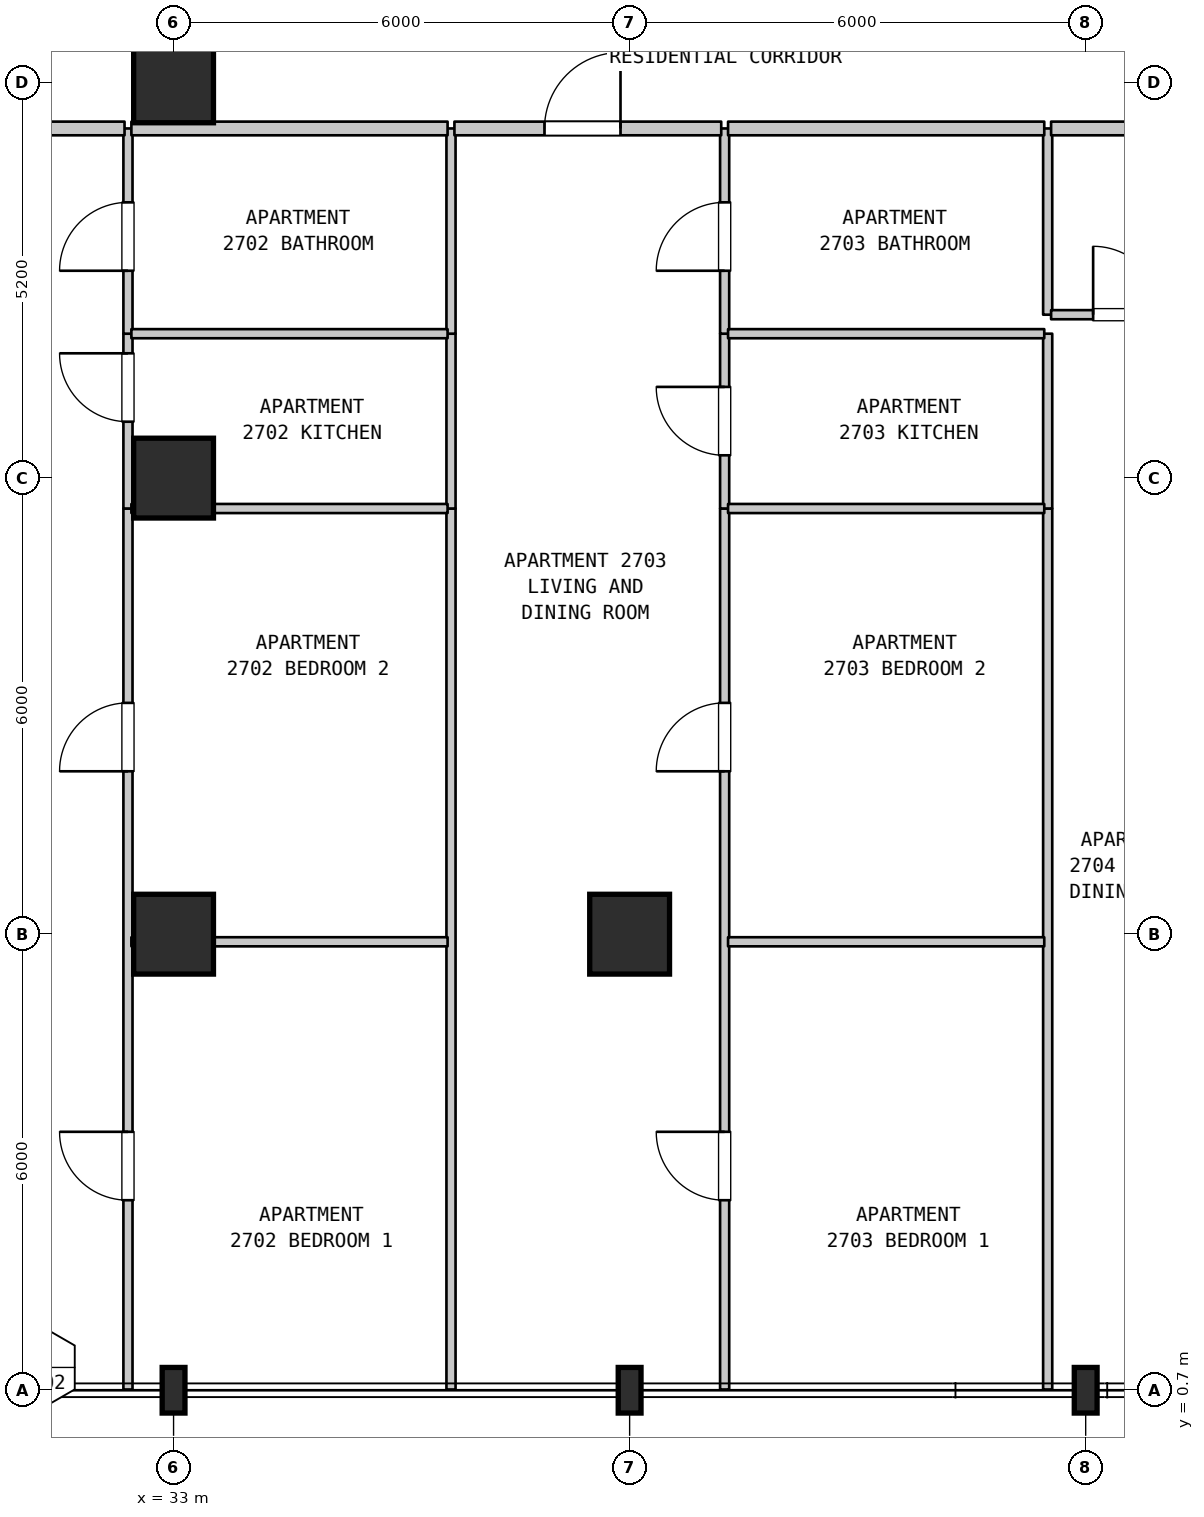
"""IFC4 building model, lengths in metres.
Left out: names, types, materials, properties, quantities, classifications, styles, units other than length and angle.
Written with IfcOpenShell. Run it as: python <this file> out.ifc"""

import sys

from ifc_helpers import new_model, si_unit, direction, frame, frame_2d, origin, origin_2d, place, context, subcontext, project, spatial, rectangle, i_section, extrude, element, fill, save


model = new_model("IFC4")
c1 = context("Model", 3, precision=1e-05, world=origin(), true_north=direction((0.0, 1.0)))
c2 = subcontext(c1, "Body", "Model", "MODEL_VIEW")
j1 = project(units=[si_unit("LENGTHUNIT", "METRE"), si_unit("PLANEANGLEUNIT", "RADIAN")], contexts=[c1])
p1 = place(None, origin())
s1 = spatial("IfcSite", under=j1, at=p1, CompositionType="ELEMENT")
p2 = place(p1, origin())
s2 = spatial("IfcBuilding", under=s1, at=p2, CompositionType="ELEMENT")
p3 = place(p2, frame((0.0, 0.0, 113.1)))
s3 = spatial("IfcBuildingStorey", under=s2, at=p3, CompositionType="ELEMENT", Elevation=113.1)
p4 = place(p3, frame((33.0, 0.7, 0.0), z_axis=(0.0, 0.0, 1.0), x_axis=(1.0, 0.0, 0.0)))
e1 = element("IfcColumn", 1, at=p4, inside=s3, PredefinedType="COLUMN", context=c2, shape_type="SweptSolid", body=[
    extrude(i_section(OverallWidth=0.3, OverallDepth=0.6, WebThickness=0.015, FlangeThickness=0.03, FilletRadius=0.027, at=origin_2d()), origin(), (0.0, 0.0, 1.0), 3.7),
])
for number, where, z_axis, x_axis in (
    (2, (33.0, 6.7, 0.0), (0.0, 0.0, 1.0), (1.0, 0.0, 0.0)),
    (3, (33.0, 12.7, 0.0), (0.0, 0.0, 1.0), (1.0, 0.0, 0.0)),
    (4, (33.0, 17.9, 0.0), (0.0, 0.0, 1.0), (1.0, 0.0, 0.0)),
):
    element("IfcColumn", number, at=place(p3, frame(where, z_axis=z_axis, x_axis=x_axis)), inside=s3, PredefinedType="COLUMN", context=c2, shape_type="SweptSolid", body=[
        extrude(rectangle(XDim=1.05, YDim=1.05, at=origin_2d()), origin(), (0.0, 0.0, 1.0), 3.7),
    ])
p5 = place(p3, frame((39.0, 0.7, 0.0), z_axis=(0.0, 0.0, 1.0), x_axis=(1.0, 0.0, 0.0)))
e5 = element("IfcColumn", 5, at=p5, inside=s3, PredefinedType="COLUMN", context=c2, shape_type="SweptSolid", body=[
    extrude(i_section(OverallWidth=0.3, OverallDepth=0.6, WebThickness=0.015, FlangeThickness=0.03, FilletRadius=0.027, at=origin_2d()), origin(), (0.0, 0.0, 1.0), 3.7),
])
p6 = place(p3, frame((39.0, 6.7, 0.0), z_axis=(0.0, 0.0, 1.0), x_axis=(1.0, 0.0, 0.0)))
e6 = element("IfcColumn", 6, at=p6, inside=s3, PredefinedType="COLUMN", context=c2, shape_type="SweptSolid", body=[
    extrude(rectangle(XDim=1.05, YDim=1.05, at=origin_2d()), origin(), (0.0, 0.0, 1.0), 3.7),
])
p7 = place(p3, frame((45.0, 0.7, 0.0), z_axis=(0.0, 0.0, 1.0), x_axis=(1.0, 0.0, 0.0)))
e7 = element("IfcColumn", 7, at=p7, inside=s3, PredefinedType="COLUMN", context=c2, shape_type="SweptSolid", body=[
    extrude(i_section(OverallWidth=0.3, OverallDepth=0.6, WebThickness=0.015, FlangeThickness=0.03, FilletRadius=0.027, at=origin_2d()), origin(), (0.0, 0.0, 1.0), 3.7),
])
p8 = place(p3, frame((32.4, 0.71, 0.0), z_axis=(0.0, 0.0, 1.0), x_axis=(0.0, 1.0, 0.0)))
e8 = element("IfcWall", 8, at=p8, inside=s3, PredefinedType="PARTITIONING", context=c2, shape_type="SweptSolid", body=[
    extrude(rectangle(XDim=11.59, YDim=0.12, at=frame_2d((5.795, 0.0))), origin(), (0.0, 0.0, 1.0), 3.385),
])
p9 = place(p8, frame((2.49, 0.0, 0.0)))
e9 = element("IfcOpeningElement", 9, at=p9, cuts=e8, PredefinedType="OPENING", context=c2, shape_type="SweptSolid", body=[
    extrude(rectangle(XDim=0.9, YDim=2.15, at=frame_2d((0.45, 1.075))), frame((0.0, 0.07, 0.0), z_axis=(0.0, -1.0, 0.0), x_axis=(1.0, 0.0, 0.0)), (0.0, 0.0, 1.0), 0.14),
])
p10 = place(p8, frame((8.133, 0.0, 0.0)))
e10 = element("IfcOpeningElement", 10, at=p10, cuts=e8, PredefinedType="OPENING", context=c2, shape_type="SweptSolid", body=[
    extrude(rectangle(XDim=0.9, YDim=2.15, at=frame_2d((0.45, 1.075))), frame((0.0, 0.07, 0.0), z_axis=(0.0, -1.0, 0.0), x_axis=(1.0, 0.0, 0.0)), (0.0, 0.0, 1.0), 0.14),
])
p11 = place(p3, frame((32.4, 12.3, 0.0), z_axis=(0.0, 0.0, 1.0), x_axis=(0.0, 1.0, 0.0)))
e11 = element("IfcWall", 11, at=p11, inside=s3, PredefinedType="PARTITIONING", context=c2, shape_type="SweptSolid", body=[
    extrude(rectangle(XDim=2.3, YDim=0.12, at=frame_2d((1.15, 0.0))), origin(), (0.0, 0.0, 1.0), 3.385),
])
p12 = place(p11, frame((1.142, 0.0, 0.0)))
e12 = element("IfcOpeningElement", 12, at=p12, cuts=e11, PredefinedType="OPENING", context=c2, shape_type="SweptSolid", body=[
    extrude(rectangle(XDim=0.9, YDim=2.15, at=frame_2d((0.45, 1.075))), frame((0.0, 0.07, 0.0), z_axis=(0.0, -1.0, 0.0), x_axis=(1.0, 0.0, 0.0)), (0.0, 0.0, 1.0), 0.14),
])
p13 = place(p3, frame((32.4, 14.6, 0.0), z_axis=(0.0, 0.0, 1.0), x_axis=(0.0, 1.0, 0.0)))
e13 = element("IfcWall", 13, at=p13, inside=s3, PredefinedType="PARTITIONING", context=c2, shape_type="SweptSolid", body=[
    extrude(rectangle(XDim=2.7, YDim=0.12, at=frame_2d((1.35, 0.0))), origin(), (0.0, 0.0, 1.0), 3.385),
])
p14 = place(p13, frame((0.828, 0.0, 0.0)))
e14 = element("IfcOpeningElement", 14, at=p14, cuts=e13, PredefinedType="OPENING", context=c2, shape_type="SweptSolid", body=[
    extrude(rectangle(XDim=0.9, YDim=2.1, at=frame_2d((0.45, 1.05))), frame((0.0, 0.07, 0.0), z_axis=(0.0, -1.0, 0.0), x_axis=(1.0, 0.0, 0.0)), (0.0, 0.0, 1.0), 0.14),
])
p15 = place(p3, frame((36.65, 0.71, 0.0), z_axis=(0.0, 0.0, 1.0), x_axis=(0.0, 1.0, 0.0)))
e15 = element("IfcWall", 15, at=p15, inside=s3, PredefinedType="PARTITIONING", context=c2, shape_type="SweptSolid", body=[
    extrude(rectangle(XDim=11.59, YDim=0.12, at=frame_2d((5.795, 0.0))), origin(), (0.0, 0.0, 1.0), 3.385),
])
p16 = place(p3, frame((36.65, 12.3, 0.0), z_axis=(0.0, 0.0, 1.0), x_axis=(0.0, 1.0, 0.0)))
e16 = element("IfcWall", 16, at=p16, inside=s3, PredefinedType="PARTITIONING", context=c2, shape_type="SweptSolid", body=[
    extrude(rectangle(XDim=2.3, YDim=0.12, at=frame_2d((1.15, 0.0))), origin(), (0.0, 0.0, 1.0), 3.385),
])
p17 = place(p3, frame((36.65, 14.6, 0.0), z_axis=(0.0, 0.0, 1.0), x_axis=(0.0, 1.0, 0.0)))
e17 = element("IfcWall", 17, at=p17, inside=s3, PredefinedType="PARTITIONING", context=c2, shape_type="SweptSolid", body=[
    extrude(rectangle(XDim=2.7, YDim=0.12, at=frame_2d((1.35, 0.0))), origin(), (0.0, 0.0, 1.0), 3.385),
])
p18 = place(p3, frame((40.25, 0.71, 0.0), z_axis=(0.0, 0.0, 1.0), x_axis=(0.0, 1.0, 0.0)))
e18 = element("IfcWall", 18, at=p18, inside=s3, PredefinedType="PARTITIONING", context=c2, shape_type="SweptSolid", body=[
    extrude(rectangle(XDim=11.59, YDim=0.12, at=frame_2d((5.795, 0.0))), origin(), (0.0, 0.0, 1.0), 3.385),
])
p19 = place(p18, frame((2.49, 0.0, 0.0)))
e19 = element("IfcOpeningElement", 19, at=p19, cuts=e18, PredefinedType="OPENING", context=c2, shape_type="SweptSolid", body=[
    extrude(rectangle(XDim=0.9, YDim=2.15, at=frame_2d((0.45, 1.075))), frame((0.0, 0.07, 0.0), z_axis=(0.0, -1.0, 0.0), x_axis=(1.0, 0.0, 0.0)), (0.0, 0.0, 1.0), 0.14),
])
p20 = place(p18, frame((8.133, 0.0, 0.0)))
e20 = element("IfcOpeningElement", 20, at=p20, cuts=e18, PredefinedType="OPENING", context=c2, shape_type="SweptSolid", body=[
    extrude(rectangle(XDim=0.9, YDim=2.15, at=frame_2d((0.45, 1.075))), frame((0.0, 0.07, 0.0), z_axis=(0.0, -1.0, 0.0), x_axis=(1.0, 0.0, 0.0)), (0.0, 0.0, 1.0), 0.14),
])
p21 = place(p3, frame((40.25, 12.3, 0.0), z_axis=(0.0, 0.0, 1.0), x_axis=(0.0, 1.0, 0.0)))
e21 = element("IfcWall", 21, at=p21, inside=s3, PredefinedType="PARTITIONING", context=c2, shape_type="SweptSolid", body=[
    extrude(rectangle(XDim=2.3, YDim=0.12, at=frame_2d((1.15, 0.0))), origin(), (0.0, 0.0, 1.0), 3.385),
])
p22 = place(p21, frame((0.7, 0.0, 0.0)))
e22 = element("IfcOpeningElement", 22, at=p22, cuts=e21, PredefinedType="OPENING", context=c2, shape_type="SweptSolid", body=[
    extrude(rectangle(XDim=0.9, YDim=2.15, at=frame_2d((0.45, 1.075))), frame((0.0, 0.07, 0.0), z_axis=(0.0, -1.0, 0.0), x_axis=(1.0, 0.0, 0.0)), (0.0, 0.0, 1.0), 0.14),
])
p23 = place(p3, frame((40.25, 14.6, 0.0), z_axis=(0.0, 0.0, 1.0), x_axis=(0.0, 1.0, 0.0)))
e23 = element("IfcWall", 23, at=p23, inside=s3, PredefinedType="PARTITIONING", context=c2, shape_type="SweptSolid", body=[
    extrude(rectangle(XDim=2.7, YDim=0.12, at=frame_2d((1.35, 0.0))), origin(), (0.0, 0.0, 1.0), 3.385),
])
p24 = place(p23, frame((0.828, 0.0, 0.0)))
e24 = element("IfcOpeningElement", 24, at=p24, cuts=e23, PredefinedType="OPENING", context=c2, shape_type="SweptSolid", body=[
    extrude(rectangle(XDim=0.9, YDim=2.1, at=frame_2d((0.45, 1.05))), frame((0.0, 0.07, 0.0), z_axis=(0.0, -1.0, 0.0), x_axis=(1.0, 0.0, 0.0)), (0.0, 0.0, 1.0), 0.14),
])
p25 = place(p3, frame((44.5, 0.71, 0.0), z_axis=(0.0, 0.0, 1.0), x_axis=(0.0, 1.0, 0.0)))
e25 = element("IfcWall", 25, at=p25, inside=s3, PredefinedType="PARTITIONING", context=c2, shape_type="SweptSolid", body=[
    extrude(rectangle(XDim=11.59, YDim=0.12, at=frame_2d((5.795, 0.0))), origin(), (0.0, 0.0, 1.0), 3.385),
])
p26 = place(p3, frame((44.5, 12.3, 0.0), z_axis=(0.0, 0.0, 1.0), x_axis=(0.0, 1.0, 0.0)))
e26 = element("IfcWall", 26, at=p26, inside=s3, PredefinedType="PARTITIONING", context=c2, shape_type="SweptSolid", body=[
    extrude(rectangle(XDim=2.3, YDim=0.12, at=frame_2d((1.15, 0.0))), origin(), (0.0, 0.0, 1.0), 3.385),
])
p27 = place(p3, frame((44.5, 14.85, 0.0), z_axis=(0.0, 0.0, 1.0), x_axis=(0.0, 1.0, 0.0)))
e27 = element("IfcWall", 27, at=p27, inside=s3, PredefinedType="PARTITIONING", context=c2, shape_type="SweptSolid", body=[
    extrude(rectangle(XDim=2.45, YDim=0.12, at=frame_2d((1.225, 0.0))), origin(), (0.0, 0.0, 1.0), 3.385),
])
p28 = place(p3, frame((32.445, 6.6, 0.0), z_axis=(0.0, 0.0, 1.0), x_axis=(1.0, 0.0, 0.0)))
e28 = element("IfcWall", 28, at=p28, inside=s3, PredefinedType="PARTITIONING", context=c2, shape_type="SweptSolid", body=[
    extrude(rectangle(XDim=4.16, YDim=0.12, at=frame_2d((2.08, 0.0))), origin(), (0.0, 0.0, 1.0), 2.935),
])
p29 = place(p3, frame((40.295, 6.6, 0.0), z_axis=(0.0, 0.0, 1.0), x_axis=(1.0, 0.0, 0.0)))
e29 = element("IfcWall", 29, at=p29, inside=s3, PredefinedType="PARTITIONING", context=c2, shape_type="SweptSolid", body=[
    extrude(rectangle(XDim=4.16, YDim=0.12, at=frame_2d((2.08, 0.0))), origin(), (0.0, 0.0, 1.0), 2.785),
])
p30 = place(p3, frame((32.445, 12.3, 0.0), z_axis=(0.0, 0.0, 1.0), x_axis=(1.0, 0.0, 0.0)))
e30 = element("IfcWall", 30, at=p30, inside=s3, PredefinedType="PARTITIONING", context=c2, shape_type="SweptSolid", body=[
    extrude(rectangle(XDim=4.16, YDim=0.12, at=frame_2d((2.08, 0.0))), origin(), (0.0, 0.0, 1.0), 3.385),
])
p31 = place(p3, frame((40.295, 12.3, 0.0), z_axis=(0.0, 0.0, 1.0), x_axis=(1.0, 0.0, 0.0)))
e31 = element("IfcWall", 31, at=p31, inside=s3, PredefinedType="PARTITIONING", context=c2, shape_type="SweptSolid", body=[
    extrude(rectangle(XDim=4.16, YDim=0.12, at=frame_2d((2.08, 0.0))), origin(), (0.0, 0.0, 1.0), 3.385),
])
p32 = place(p3, frame((32.445, 14.6, 0.0), z_axis=(0.0, 0.0, 1.0), x_axis=(1.0, 0.0, 0.0)))
e32 = element("IfcWall", 32, at=p32, inside=s3, PredefinedType="PARTITIONING", context=c2, shape_type="SweptSolid", body=[
    extrude(rectangle(XDim=4.16, YDim=0.12, at=frame_2d((2.08, 0.0))), origin(), (0.0, 0.0, 1.0), 3.385),
])
p33 = place(p3, frame((40.295, 14.6, 0.0), z_axis=(0.0, 0.0, 1.0), x_axis=(1.0, 0.0, 0.0)))
e33 = element("IfcWall", 33, at=p33, inside=s3, PredefinedType="PARTITIONING", context=c2, shape_type="SweptSolid", body=[
    extrude(rectangle(XDim=4.16, YDim=0.12, at=frame_2d((2.08, 0.0))), origin(), (0.0, 0.0, 1.0), 3.385),
])
p34 = place(p3, frame((44.545, 14.85, 0.0), z_axis=(0.0, 0.0, 1.0), x_axis=(1.0, 0.0, 0.0)))
e34 = element("IfcWall", 34, at=p34, inside=s3, PredefinedType="PARTITIONING", context=c2, shape_type="SweptSolid", body=[
    extrude(rectangle(XDim=2.16, YDim=0.12, at=frame_2d((1.08, 0.0))), origin(), (0.0, 0.0, 1.0), 3.385),
])
p35 = place(p34, frame((0.553, 0.0, 0.0)))
e35 = element("IfcOpeningElement", 35, at=p35, cuts=e34, PredefinedType="OPENING", context=c2, shape_type="SweptSolid", body=[
    extrude(rectangle(XDim=0.9, YDim=2.15, at=frame_2d((0.45, 1.075))), frame((0.0, 0.07, 0.0), z_axis=(0.0, -1.0, 0.0), x_axis=(1.0, 0.0, 0.0)), (0.0, 0.0, 1.0), 0.14),
])
p36 = place(p3, frame((28.845, 17.3, 0.0), z_axis=(0.0, 0.0, 1.0), x_axis=(1.0, 0.0, 0.0)))
e36 = element("IfcWall", 36, at=p36, inside=s3, PredefinedType="STANDARD", context=c2, shape_type="SweptSolid", body=[
    extrude(rectangle(XDim=3.51, YDim=0.18, at=frame_2d((1.755, 0.0))), origin(), (0.0, 0.0, 1.0), 3.385),
])
p37 = place(p36, frame((1.255, 0.0, 0.0)))
e37 = element("IfcOpeningElement", 37, at=p37, cuts=e36, PredefinedType="OPENING", context=c2, shape_type="SweptSolid", body=[
    extrude(rectangle(XDim=1.0, YDim=2.15, at=frame_2d((0.5, 1.075))), frame((0.0, 0.1, 0.0), z_axis=(0.0, -1.0, 0.0), x_axis=(1.0, 0.0, 0.0)), (0.0, 0.0, 1.0), 0.2),
])
p38 = place(p3, frame((32.445, 17.3, 0.0), z_axis=(0.0, 0.0, 1.0), x_axis=(1.0, 0.0, 0.0)))
e38 = element("IfcWall", 38, at=p38, inside=s3, PredefinedType="STANDARD", context=c2, shape_type="SweptSolid", body=[
    extrude(rectangle(XDim=4.16, YDim=0.18, at=frame_2d((2.08, 0.0))), origin(), (0.0, 0.0, 1.0), 3.385),
])
p39 = place(p3, frame((36.695, 17.3, 0.0), z_axis=(0.0, 0.0, 1.0), x_axis=(1.0, 0.0, 0.0)))
e39 = element("IfcWall", 39, at=p39, inside=s3, PredefinedType="STANDARD", context=c2, shape_type="SweptSolid", body=[
    extrude(rectangle(XDim=3.51, YDim=0.18, at=frame_2d((1.755, 0.0))), origin(), (0.0, 0.0, 1.0), 3.385),
])
p40 = place(p39, frame((1.185, 0.0, 0.0)))
e40 = element("IfcOpeningElement", 40, at=p40, cuts=e39, PredefinedType="OPENING", context=c2, shape_type="SweptSolid", body=[
    extrude(rectangle(XDim=1.0, YDim=2.15, at=frame_2d((0.5, 1.075))), frame((0.0, 0.1, 0.0), z_axis=(0.0, -1.0, 0.0), x_axis=(1.0, 0.0, 0.0)), (0.0, 0.0, 1.0), 0.2),
])
p41 = place(p3, frame((40.295, 17.3, 0.0), z_axis=(0.0, 0.0, 1.0), x_axis=(1.0, 0.0, 0.0)))
e41 = element("IfcWall", 41, at=p41, inside=s3, PredefinedType="STANDARD", context=c2, shape_type="SweptSolid", body=[
    extrude(rectangle(XDim=4.16, YDim=0.18, at=frame_2d((2.08, 0.0))), origin(), (0.0, 0.0, 1.0), 3.385),
])
p42 = place(p3, frame((44.545, 17.3, 0.0), z_axis=(0.0, 0.0, 1.0), x_axis=(1.0, 0.0, 0.0)))
e42 = element("IfcWall", 42, at=p42, inside=s3, PredefinedType="STANDARD", context=c2, shape_type="SweptSolid", body=[
    extrude(rectangle(XDim=4.68, YDim=0.18, at=frame_2d((2.34, 0.0))), origin(), (0.0, 0.0, 1.0), 3.385),
])
p43 = place(p42, frame((1.769, 0.0, 0.0)))
e43 = element("IfcOpeningElement", 43, at=p43, cuts=e42, PredefinedType="OPENING", context=c2, shape_type="SweptSolid", body=[
    extrude(rectangle(XDim=1.0, YDim=2.15, at=frame_2d((0.5, 1.075))), frame((0.0, 0.1, 0.0), z_axis=(0.0, -1.0, 0.0), x_axis=(1.0, 0.0, 0.0)), (0.0, 0.0, 1.0), 0.2),
])
p44 = place(p9, origin())
e44 = element("IfcDoor", 44, at=p44, inside=s3, OperationType="SINGLE_SWING_RIGHT", PredefinedType="DOOR", context=c2, shape_type="SweptSolid", body=[
    extrude(rectangle(XDim=0.9, YDim=2.15, at=frame_2d((0.45, 1.075))), frame((0.0, 0.025, 0.0), z_axis=(0.0, -1.0, 0.0), x_axis=(1.0, 0.0, 0.0)), (0.0, 0.0, 1.0), 0.05),
])
fill(e9, e44)
p45 = place(p10, origin())
e45 = element("IfcDoor", 45, at=p45, inside=s3, OperationType="SINGLE_SWING_LEFT", PredefinedType="DOOR", context=c2, shape_type="SweptSolid", body=[
    extrude(rectangle(XDim=0.9, YDim=2.15, at=frame_2d((0.45, 1.075))), frame((0.0, 0.025, 0.0), z_axis=(0.0, -1.0, 0.0), x_axis=(1.0, 0.0, 0.0)), (0.0, 0.0, 1.0), 0.05),
])
fill(e10, e45)
p46 = place(p12, origin())
e46 = element("IfcDoor", 46, at=p46, inside=s3, OperationType="SINGLE_SWING_RIGHT", PredefinedType="DOOR", context=c2, shape_type="SweptSolid", body=[
    extrude(rectangle(XDim=0.9, YDim=2.15, at=frame_2d((0.45, 1.075))), frame((0.0, 0.025, 0.0), z_axis=(0.0, -1.0, 0.0), x_axis=(1.0, 0.0, 0.0)), (0.0, 0.0, 1.0), 0.05),
])
fill(e12, e46)
p47 = place(p14, origin())
e47 = element("IfcDoor", 47, at=p47, inside=s3, OperationType="SINGLE_SWING_LEFT", PredefinedType="DOOR", context=c2, shape_type="SweptSolid", body=[
    extrude(rectangle(XDim=0.9, YDim=2.1, at=frame_2d((0.45, 1.05))), frame((0.0, 0.025, 0.0), z_axis=(0.0, -1.0, 0.0), x_axis=(1.0, 0.0, 0.0)), (0.0, 0.0, 1.0), 0.05),
])
fill(e14, e47)
p48 = place(p19, origin())
e48 = element("IfcDoor", 48, at=p48, inside=s3, OperationType="SINGLE_SWING_RIGHT", PredefinedType="DOOR", context=c2, shape_type="SweptSolid", body=[
    extrude(rectangle(XDim=0.9, YDim=2.15, at=frame_2d((0.45, 1.075))), frame((0.0, 0.025, 0.0), z_axis=(0.0, -1.0, 0.0), x_axis=(1.0, 0.0, 0.0)), (0.0, 0.0, 1.0), 0.05),
])
fill(e19, e48)
p49 = place(p20, origin())
e49 = element("IfcDoor", 49, at=p49, inside=s3, OperationType="SINGLE_SWING_LEFT", PredefinedType="DOOR", context=c2, shape_type="SweptSolid", body=[
    extrude(rectangle(XDim=0.9, YDim=2.15, at=frame_2d((0.45, 1.075))), frame((0.0, 0.025, 0.0), z_axis=(0.0, -1.0, 0.0), x_axis=(1.0, 0.0, 0.0)), (0.0, 0.0, 1.0), 0.05),
])
fill(e20, e49)
p50 = place(p22, origin())
e50 = element("IfcDoor", 50, at=p50, inside=s3, OperationType="SINGLE_SWING_RIGHT", PredefinedType="DOOR", context=c2, shape_type="SweptSolid", body=[
    extrude(rectangle(XDim=0.9, YDim=2.15, at=frame_2d((0.45, 1.075))), frame((0.0, 0.025, 0.0), z_axis=(0.0, -1.0, 0.0), x_axis=(1.0, 0.0, 0.0)), (0.0, 0.0, 1.0), 0.05),
])
fill(e22, e50)
p51 = place(p24, origin())
e51 = element("IfcDoor", 51, at=p51, inside=s3, OperationType="SINGLE_SWING_LEFT", PredefinedType="DOOR", context=c2, shape_type="SweptSolid", body=[
    extrude(rectangle(XDim=0.9, YDim=2.1, at=frame_2d((0.45, 1.05))), frame((0.0, 0.025, 0.0), z_axis=(0.0, -1.0, 0.0), x_axis=(1.0, 0.0, 0.0)), (0.0, 0.0, 1.0), 0.05),
])
fill(e24, e51)
p52 = place(p35, origin())
e52 = element("IfcDoor", 52, at=p52, inside=s3, OperationType="SINGLE_SWING_LEFT", PredefinedType="DOOR", context=c2, shape_type="SweptSolid", body=[
    extrude(rectangle(XDim=0.9, YDim=2.15, at=frame_2d((0.45, 1.075))), frame((0.0, 0.025, 0.0), z_axis=(0.0, -1.0, 0.0), x_axis=(1.0, 0.0, 0.0)), (0.0, 0.0, 1.0), 0.05),
])
fill(e35, e52)
p53 = place(p40, origin())
e53 = element("IfcDoor", 53, at=p53, inside=s3, OperationType="SINGLE_SWING_RIGHT", PredefinedType="DOOR", context=c2, shape_type="SweptSolid", body=[
    extrude(rectangle(XDim=1.0, YDim=2.15, at=frame_2d((0.5, 1.075))), frame((0.0, 0.025, 0.0), z_axis=(0.0, -1.0, 0.0), x_axis=(1.0, 0.0, 0.0)), (0.0, 0.0, 1.0), 0.05),
])
fill(e40, e53)
save(model, sys.argv[1])
